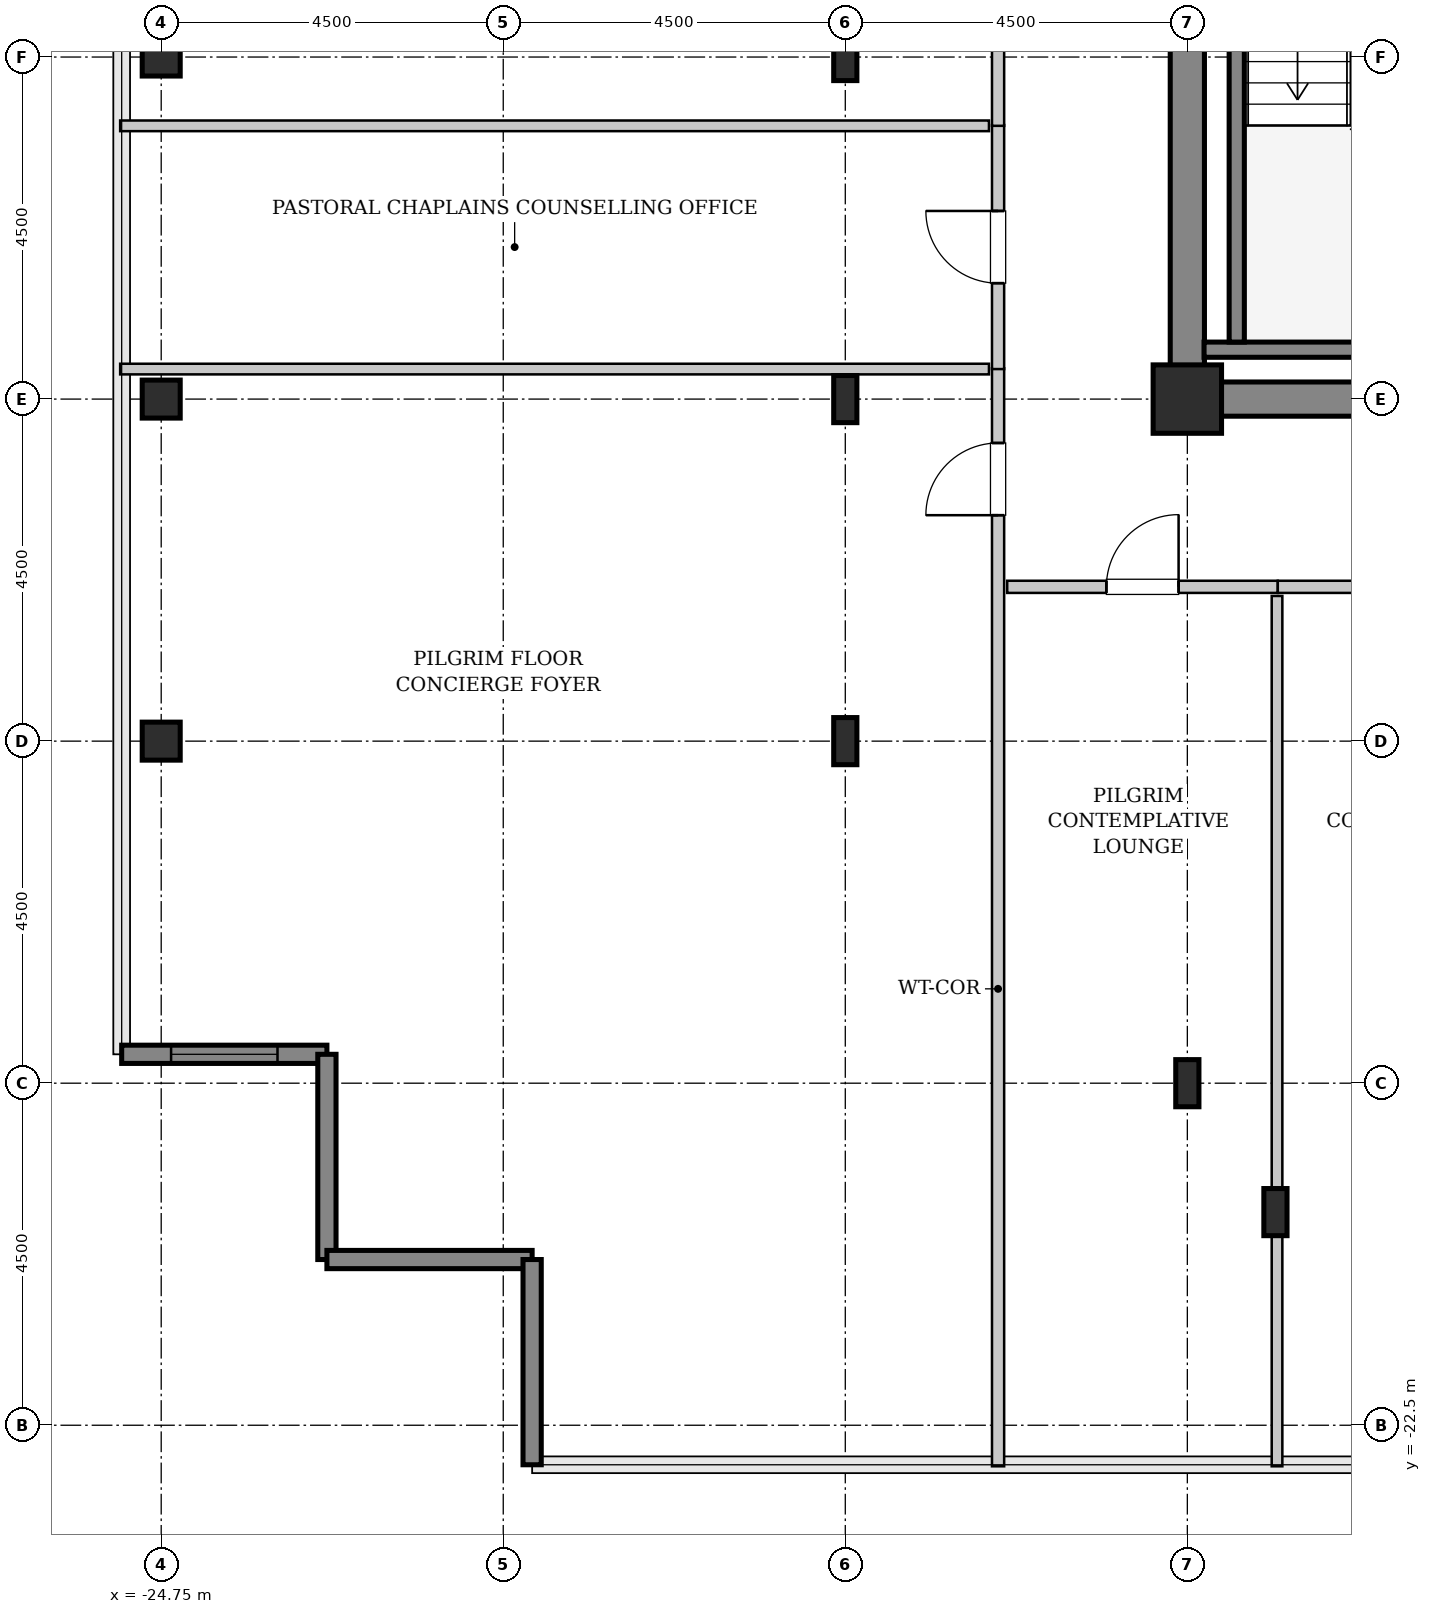
"""IFC4 building model, lengths in metres.
Left out: names, types, materials, properties, quantities, classifications, styles, units other than length and angle.
Written with IfcOpenShell. Run it as: python <this file> out.ifc"""

import sys

from ifc_helpers import new_model, si_unit, direction, frame, frame_2d, origin, origin_2d, place, context, subcontext, project, spatial, rectangle, hollow_rectangle, i_section, extrude, source, transform, mapped, element, fill, save


model = new_model("IFC4")
c1 = context("Model", 3, precision=1e-05, world=origin(), true_north=direction((0.0, 1.0)))
c2 = subcontext(c1, "Body", "Model", "MODEL_VIEW")
j1 = project(units=[si_unit("LENGTHUNIT", "METRE"), si_unit("PLANEANGLEUNIT", "RADIAN")], contexts=[c1])
p1 = place(None, origin())
s1 = spatial("IfcSite", under=j1, at=p1, CompositionType="ELEMENT")
p2 = place(p1, origin())
s2 = spatial("IfcBuilding", under=s1, at=p2, CompositionType="ELEMENT")
p3 = place(p2, frame((0.0, 0.0, 306.4)))
s3 = spatial("IfcBuildingStorey", under=s2, at=p3, CompositionType="ELEMENT", Elevation=306.4)
m1 = source(origin(), c2, "Body", "SweptSolid", [
    extrude(rectangle(XDim=9.925, YDim=0.45, at=frame_2d((4.962, 0.0))), origin(), (0.0, 0.0, 1.0), 3.8),
])
p4 = place(p3, frame((-11.475, -9.0, 0.0), z_axis=(0.0, 0.0, 1.0), x_axis=(1.0, 0.0, 0.0)))
e1 = element("IfcWall", 1, at=p4, inside=s3, PredefinedType="SHEAR", context=c2, shape_type="MappedRepresentation", body=[
    mapped(m1, transform((0.0, 0.0, 0.0), x_axis=(1.0, 0.0, 0.0), y_axis=(0.0, 1.0, 0.0), z_axis=(0.0, 0.0, 1.0), scale=1.0)),
])
m2 = source(origin(), c2, "Body", "SweptSolid", [
    extrude(rectangle(XDim=7.425, YDim=0.45, at=frame_2d((3.712, 0.0))), origin(), (0.0, 0.0, 1.0), 3.8),
])
p5 = place(p3, frame((-11.25, -8.775, 0.0), z_axis=(0.0, 0.0, 1.0), x_axis=(0.0, 1.0, 0.0)))
e2 = element("IfcWall", 2, at=p5, inside=s3, PredefinedType="SHEAR", context=c2, shape_type="MappedRepresentation", body=[
    mapped(m2, transform((0.0, 0.0, 0.0), x_axis=(1.0, 0.0, 0.0), y_axis=(0.0, 1.0, 0.0), z_axis=(0.0, 0.0, 1.0), scale=1.0)),
])
m3 = source(origin(), c2, "Body", "SweptSolid", [
    extrude(hollow_rectangle(XDim=0.5, YDim=0.5, WallThickness=0.025, InnerFilletRadius=0.025, OuterFilletRadius=0.05, at=origin_2d()), origin(), (0.0, 0.0, 1.0), 3.8),
])
for number, where, z_axis, x_axis in (
    (3, (-24.75, -13.5, 0.0), (0.0, 0.0, 1.0), (1.0, 0.0, 0.0)),
    (4, (-24.75, -9.0, 0.0), (0.0, 0.0, 1.0), (1.0, 0.0, 0.0)),
    (5, (-24.75, -4.5, 0.0), (0.0, 0.0, 1.0), (1.0, 0.0, 0.0)),
):
    element("IfcColumn", number, at=place(p3, frame(where, z_axis=z_axis, x_axis=x_axis)), inside=s3, PredefinedType="COLUMN", context=c2, shape_type="MappedRepresentation", body=[
        mapped(m3, transform((0.0, 0.0, 0.0), x_axis=(1.0, 0.0, 0.0), y_axis=(0.0, 1.0, 0.0), z_axis=(0.0, 0.0, 1.0), scale=1.0)),
    ])
m4 = source(origin(), c2, "Body", "SweptSolid", [
    extrude(i_section(OverallWidth=0.305, OverallDepth=0.62, WebThickness=0.021, FlangeThickness=0.04, FilletRadius=0.027, at=origin_2d()), origin(), (0.0, 0.0, 1.0), 3.8),
])
for number, where, z_axis, x_axis in (
    (6, (-15.75, -13.5, 0.0), (0.0, 0.0, 1.0), (1.0, 0.0, 0.0)),
    (7, (-15.75, -9.0, 0.0), (0.0, 0.0, 1.0), (1.0, 0.0, 0.0)),
    (8, (-15.75, -4.5, 0.0), (0.0, 0.0, 1.0), (1.0, 0.0, 0.0)),
    (9, (-11.25, -18.0, 0.0), (0.0, 0.0, 1.0), (1.0, 0.0, 0.0)),
):
    element("IfcColumn", number, at=place(p3, frame(where, z_axis=z_axis, x_axis=x_axis)), inside=s3, PredefinedType="COLUMN", context=c2, shape_type="MappedRepresentation", body=[
        mapped(m4, transform((0.0, 0.0, 0.0), x_axis=(1.0, 0.0, 0.0), y_axis=(0.0, 1.0, 0.0), z_axis=(0.0, 0.0, 1.0), scale=1.0)),
    ])
m5 = source(origin(), c2, "Body", "SweptSolid", [
    extrude(rectangle(XDim=0.9, YDim=0.9, at=origin_2d()), origin(), (0.0, 0.0, 1.0), 3.8),
])
p6 = place(p3, frame((-11.25, -9.0, 0.0), z_axis=(0.0, 0.0, 1.0), x_axis=(1.0, 0.0, 0.0)))
e10 = element("IfcColumn", 10, at=p6, inside=s3, PredefinedType="COLUMN", context=c2, shape_type="MappedRepresentation", body=[
    mapped(m5, transform((0.0, 0.0, 0.0), x_axis=(1.0, 0.0, 0.0), y_axis=(0.0, 1.0, 0.0), z_axis=(0.0, 0.0, 1.0), scale=1.0)),
])
p7 = place(p3, frame((-10.091, -19.696, 0.0), z_axis=(0.0, 0.0, 1.0), x_axis=(1.0, 0.0, 0.0)))
e11 = element("IfcColumn", 11, at=p7, inside=s3, PredefinedType="COLUMN", context=c2, shape_type="MappedRepresentation", body=[
    mapped(m4, transform((0.0, 0.0, 0.0), x_axis=(1.0, 0.0, 0.0), y_axis=(0.0, 1.0, 0.0), z_axis=(0.0, 0.0, 1.0), scale=1.0)),
])
m6 = source(origin(), c2, "Body", "SweptSolid", [
    extrude(rectangle(XDim=2.7, YDim=0.24, at=frame_2d((1.35, 0.0))), origin(), (0.0, 0.0, 1.0), 3.55),
])
p8 = place(p3, frame((-25.27, -17.62, 0.0), z_axis=(0.0, 0.0, 1.0), x_axis=(1.0, 0.0, 0.0)))
e12 = element("IfcWall", 12, at=p8, inside=s3, PredefinedType="SHEAR", context=c2, shape_type="MappedRepresentation", body=[
    mapped(m6, transform((0.0, 0.0, 0.0), x_axis=(1.0, 0.0, 0.0), y_axis=(0.0, 1.0, 0.0), z_axis=(0.0, 0.0, 1.0), scale=1.0)),
])
p9 = place(p8, frame((0.65, 0.0, 0.85)))
e13 = element("IfcOpeningElement", 13, at=p9, cuts=e12, PredefinedType="OPENING", context=c2, shape_type="SweptSolid", body=[
    extrude(rectangle(XDim=1.4, YDim=1.8, at=frame_2d((0.7, 0.9))), frame((0.0, 0.13, 0.0), z_axis=(0.0, -1.0, 0.0), x_axis=(1.0, 0.0, 0.0)), (0.0, 0.0, 1.0), 0.26),
])
for number, where, z_axis, x_axis in (
    (14, (-22.57, -17.62, 0.0), (0.0, 0.0, 1.0), (0.0, -1.0, 0.0)),
    (15, (-22.57, -20.32, 0.0), (0.0, 0.0, 1.0), (1.0, 0.0, 0.0)),
    (16, (-19.87, -20.32, 0.0), (0.0, 0.0, 1.0), (0.0, -1.0, 0.0)),
):
    element("IfcWall", number, at=place(p3, frame(where, z_axis=z_axis, x_axis=x_axis)), inside=s3, PredefinedType="SHEAR", context=c2, shape_type="MappedRepresentation", body=[
        mapped(m6, transform((0.0, 0.0, 0.0), x_axis=(1.0, 0.0, 0.0), y_axis=(0.0, 1.0, 0.0), z_axis=(0.0, 0.0, 1.0), scale=1.0)),
    ])
m7 = source(origin(), c2, "Body", "SweptSolid", [
    extrude(rectangle(XDim=3.73, YDim=0.2, at=frame_2d((1.865, 0.0))), origin(), (0.0, 0.0, 1.0), 3.8),
])
p10 = place(p3, frame((-11.03, -8.35, 0.0), z_axis=(0.0, 0.0, 1.0), x_axis=(1.0, 0.0, 0.0)))
e17 = element("IfcWall", 17, at=p10, inside=s3, PredefinedType="SOLIDWALL", context=c2, shape_type="MappedRepresentation", body=[
    mapped(m7, transform((0.0, 0.0, 0.0), x_axis=(1.0, 0.0, 0.0), y_axis=(0.0, 1.0, 0.0), z_axis=(0.0, 0.0, 1.0), scale=1.0)),
])
m8 = source(origin(), c2, "Body", "SweptSolid", [
    extrude(rectangle(XDim=7.1, YDim=0.2, at=frame_2d((3.55, 0.0))), origin(), (0.0, 0.0, 1.0), 3.8),
])
p11 = place(p3, frame((-10.6, -1.15, 0.0), z_axis=(0.0, 0.0, 1.0), x_axis=(0.0, -1.0, 0.0)))
e18 = element("IfcWall", 18, at=p11, inside=s3, PredefinedType="SOLIDWALL", context=c2, shape_type="MappedRepresentation", body=[
    mapped(m8, transform((0.0, 0.0, 0.0), x_axis=(1.0, 0.0, 0.0), y_axis=(0.0, 1.0, 0.0), z_axis=(0.0, 0.0, 1.0), scale=1.0)),
])
m9 = source(origin(), c2, "Body", "SweptSolid", [
    extrude(rectangle(XDim=14.445, YDim=0.16, at=frame_2d((7.223, 0.0))), origin(), (0.0, 0.0, 1.0), 3.535),
])
p12 = place(p3, frame((-13.74, -23.04, 0.0), z_axis=(0.0, 0.0, 1.0), x_axis=(0.0, 1.0, 0.0)))
e19 = element("IfcWall", 19, at=p12, inside=s3, PredefinedType="PARTITIONING", context=c2, shape_type="MappedRepresentation", body=[
    mapped(m9, transform((0.0, 0.0, 0.0), x_axis=(1.0, 0.0, 0.0), y_axis=(0.0, 1.0, 0.0), z_axis=(0.0, 0.0, 1.0), scale=1.0)),
])
p13 = place(p12, frame((12.512, 0.0, 0.0)))
e20 = element("IfcOpeningElement", 20, at=p13, cuts=e19, PredefinedType="OPENING", context=c2, shape_type="SweptSolid", body=[
    extrude(rectangle(XDim=0.95, YDim=2.1, at=frame_2d((0.475, 1.05))), frame((0.0, 0.09, 0.0), z_axis=(0.0, -1.0, 0.0), x_axis=(1.0, 0.0, 0.0)), (0.0, 0.0, 1.0), 0.18),
])
m10 = source(origin(), c2, "Body", "SweptSolid", [
    extrude(rectangle(XDim=11.43, YDim=0.14, at=frame_2d((5.715, 0.0))), origin(), (0.0, 0.0, 1.0), 2.975),
])
p14 = place(p3, frame((-25.29, -8.605, 0.0), z_axis=(0.0, 0.0, 1.0), x_axis=(1.0, 0.0, 0.0)))
e21 = element("IfcWall", 21, at=p14, inside=s3, PredefinedType="PARTITIONING", context=c2, shape_type="MappedRepresentation", body=[
    mapped(m10, transform((0.0, 0.0, 0.0), x_axis=(1.0, 0.0, 0.0), y_axis=(0.0, 1.0, 0.0), z_axis=(0.0, 0.0, 1.0), scale=1.0)),
])
m11 = source(origin(), c2, "Body", "SweptSolid", [
    extrude(rectangle(XDim=3.21, YDim=0.16, at=frame_2d((1.605, 0.0))), origin(), (0.0, 0.0, 1.0), 3.535),
])
p15 = place(p3, frame((-13.74, -8.605, 0.0), z_axis=(0.0, 0.0, 1.0), x_axis=(0.0, 1.0, 0.0)))
e22 = element("IfcWall", 22, at=p15, inside=s3, PredefinedType="PARTITIONING", context=c2, shape_type="MappedRepresentation", body=[
    mapped(m11, transform((0.0, 0.0, 0.0), x_axis=(1.0, 0.0, 0.0), y_axis=(0.0, 1.0, 0.0), z_axis=(0.0, 0.0, 1.0), scale=1.0)),
])
p16 = place(p15, frame((1.13, 0.0, 0.0)))
e23 = element("IfcOpeningElement", 23, at=p16, cuts=e22, PredefinedType="OPENING", context=c2, shape_type="SweptSolid", body=[
    extrude(rectangle(XDim=0.95, YDim=2.1, at=frame_2d((0.475, 1.05))), frame((0.0, 0.09, 0.0), z_axis=(0.0, -1.0, 0.0), x_axis=(1.0, 0.0, 0.0)), (0.0, 0.0, 1.0), 0.18),
])
m12 = source(origin(), c2, "Body", "SweptSolid", [
    extrude(rectangle(XDim=11.43, YDim=0.14, at=frame_2d((5.715, 0.0))), origin(), (0.0, 0.0, 1.0), 3.535),
])
p17 = place(p3, frame((-25.29, -5.405, 0.0), z_axis=(0.0, 0.0, 1.0), x_axis=(1.0, 0.0, 0.0)))
e24 = element("IfcWall", 24, at=p17, inside=s3, PredefinedType="PARTITIONING", context=c2, shape_type="MappedRepresentation", body=[
    mapped(m12, transform((0.0, 0.0, 0.0), x_axis=(1.0, 0.0, 0.0), y_axis=(0.0, 1.0, 0.0), z_axis=(0.0, 0.0, 1.0), scale=1.0)),
])
m13 = source(origin(), c2, "Body", "SweptSolid", [
    extrude(rectangle(XDim=5.41, YDim=0.16, at=frame_2d((2.705, 0.0))), origin(), (0.0, 0.0, 1.0), 3.535),
])
p18 = place(p3, frame((-13.74, -5.405, 0.0), z_axis=(0.0, 0.0, 1.0), x_axis=(0.0, 1.0, 0.0)))
e25 = element("IfcWall", 25, at=p18, inside=s3, PredefinedType="PARTITIONING", context=c2, shape_type="MappedRepresentation", body=[
    mapped(m13, transform((0.0, 0.0, 0.0), x_axis=(1.0, 0.0, 0.0), y_axis=(0.0, 1.0, 0.0), z_axis=(0.0, 0.0, 1.0), scale=1.0)),
])
p19 = place(p18, frame((2.23, 0.0, 0.0)))
e26 = element("IfcOpeningElement", 26, at=p19, cuts=e25, PredefinedType="OPENING", context=c2, shape_type="SweptSolid", body=[
    extrude(rectangle(XDim=0.95, YDim=2.1, at=frame_2d((0.475, 1.05))), frame((0.0, 0.09, 0.0), z_axis=(0.0, -1.0, 0.0), x_axis=(1.0, 0.0, 0.0)), (0.0, 0.0, 1.0), 0.18),
])
m14 = source(origin(), c2, "Body", "SweptSolid", [
    extrude(rectangle(XDim=3.56, YDim=0.16, at=frame_2d((1.78, 0.0))), origin(), (0.0, 0.0, 1.0), 3.535),
])
p20 = place(p3, frame((-13.62, -11.47, 0.0), z_axis=(0.0, 0.0, 1.0), x_axis=(1.0, 0.0, 0.0)))
e27 = element("IfcWall", 27, at=p20, inside=s3, PredefinedType="PARTITIONING", context=c2, shape_type="MappedRepresentation", body=[
    mapped(m14, transform((0.0, 0.0, 0.0), x_axis=(1.0, 0.0, 0.0), y_axis=(0.0, 1.0, 0.0), z_axis=(0.0, 0.0, 1.0), scale=1.0)),
])
p21 = place(p20, frame((1.305, 0.0, 0.0)))
e28 = element("IfcOpeningElement", 28, at=p21, cuts=e27, PredefinedType="OPENING", context=c2, shape_type="SweptSolid", body=[
    extrude(rectangle(XDim=0.95, YDim=2.1, at=frame_2d((0.475, 1.05))), frame((0.0, 0.09, 0.0), z_axis=(0.0, -1.0, 0.0), x_axis=(1.0, 0.0, 0.0)), (0.0, 0.0, 1.0), 0.18),
])
m15 = source(origin(), c2, "Body", "SweptSolid", [
    extrude(rectangle(XDim=11.45, YDim=0.14, at=frame_2d((5.725, 0.0))), origin(), (0.0, 0.0, 1.0), 3.535),
])
p22 = place(p3, frame((-10.07, -23.04, 0.0), z_axis=(0.0, 0.0, 1.0), x_axis=(0.0, 1.0, 0.0)))
e29 = element("IfcWall", 29, at=p22, inside=s3, PredefinedType="PARTITIONING", context=c2, shape_type="MappedRepresentation", body=[
    mapped(m15, transform((0.0, 0.0, 0.0), x_axis=(1.0, 0.0, 0.0), y_axis=(0.0, 1.0, 0.0), z_axis=(0.0, 0.0, 1.0), scale=1.0)),
])
m16 = source(origin(), c2, "Body", "SweptSolid", [
    extrude(rectangle(XDim=3.665, YDim=0.16, at=frame_2d((1.833, 0.0))), origin(), (0.0, 0.0, 1.0), 3.535),
])
p23 = place(p3, frame((-10.06, -11.47, 0.0), z_axis=(0.0, 0.0, 1.0), x_axis=(1.0, 0.0, 0.0)))
e30 = element("IfcWall", 30, at=p23, inside=s3, PredefinedType="PARTITIONING", context=c2, shape_type="MappedRepresentation", body=[
    mapped(m16, transform((0.0, 0.0, 0.0), x_axis=(1.0, 0.0, 0.0), y_axis=(0.0, 1.0, 0.0), z_axis=(0.0, 0.0, 1.0), scale=1.0)),
])
p24 = place(p23, frame((1.357, 0.0, 0.0)))
e31 = element("IfcOpeningElement", 31, at=p24, cuts=e30, PredefinedType="OPENING", context=c2, shape_type="SweptSolid", body=[
    extrude(rectangle(XDim=0.95, YDim=2.1, at=frame_2d((0.475, 1.05))), frame((0.0, 0.09, 0.0), z_axis=(0.0, -1.0, 0.0), x_axis=(1.0, 0.0, 0.0)), (0.0, 0.0, 1.0), 0.18),
])
m17 = source(origin(), c2, "Body", "SweptSolid", [
    extrude(rectangle(XDim=1.4, YDim=1.8, at=frame_2d((0.7, 0.9))), frame((0.0, 0.03, 0.0), z_axis=(0.0, -1.0, 0.0), x_axis=(1.0, 0.0, 0.0)), (0.0, 0.0, 1.0), 0.06),
])
p25 = place(p9, origin())
e32 = element("IfcWindow", 32, at=p25, inside=s3, PartitioningType="SINGLE_PANEL", PredefinedType="WINDOW", context=c2, shape_type="MappedRepresentation", body=[
    mapped(m17, transform((0.0, 0.0, 0.0), x_axis=(1.0, 0.0, 0.0), y_axis=(0.0, 1.0, 0.0), z_axis=(0.0, 0.0, 1.0), scale=1.0)),
])
fill(e13, e32)
m18 = source(origin(), c2, "Body", "SweptSolid", [
    extrude(rectangle(XDim=0.95, YDim=2.1, at=frame_2d((0.475, 1.05))), frame((0.0, 0.025, 0.0), z_axis=(0.0, -1.0, 0.0), x_axis=(1.0, 0.0, 0.0)), (0.0, 0.0, 1.0), 0.05),
])
p26 = place(p13, origin())
e33 = element("IfcDoor", 33, at=p26, inside=s3, OperationType="SINGLE_SWING_LEFT", PredefinedType="DOOR", context=c2, shape_type="MappedRepresentation", body=[
    mapped(m18, transform((0.0, 0.0, 0.0), x_axis=(1.0, 0.0, 0.0), y_axis=(0.0, 1.0, 0.0), z_axis=(0.0, 0.0, 1.0), scale=1.0)),
])
fill(e20, e33)
p27 = place(p16, origin())
e34 = element("IfcDoor", 34, at=p27, inside=s3, OperationType="SINGLE_SWING_RIGHT", PredefinedType="DOOR", context=c2, shape_type="MappedRepresentation", body=[
    mapped(m18, transform((0.0, 0.0, 0.0), x_axis=(1.0, 0.0, 0.0), y_axis=(0.0, 1.0, 0.0), z_axis=(0.0, 0.0, 1.0), scale=1.0)),
])
fill(e23, e34)
p28 = place(p21, origin())
e35 = element("IfcDoor", 35, at=p28, inside=s3, OperationType="SINGLE_SWING_RIGHT", PredefinedType="DOOR", context=c2, shape_type="MappedRepresentation", body=[
    mapped(m18, transform((0.0, 0.0, 0.0), x_axis=(1.0, 0.0, 0.0), y_axis=(0.0, 1.0, 0.0), z_axis=(0.0, 0.0, 1.0), scale=1.0)),
])
fill(e28, e35)
save(model, sys.argv[1])
